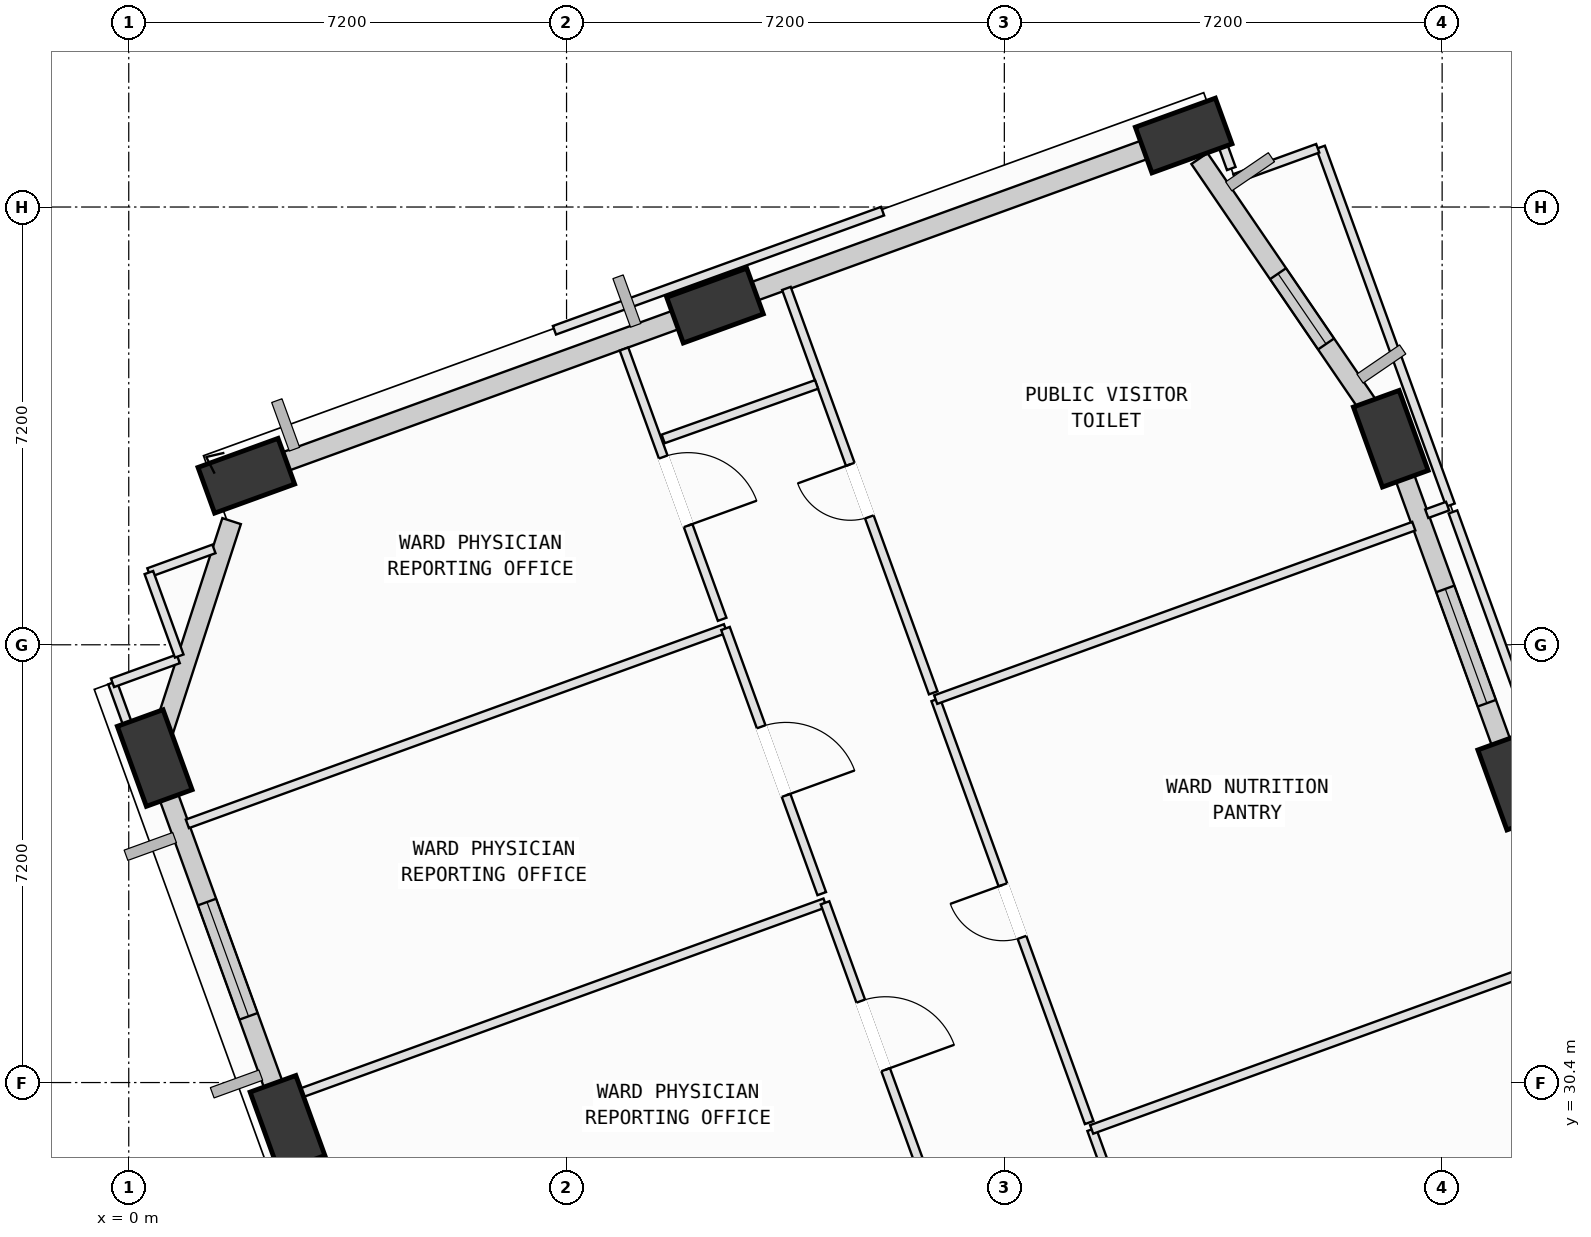
"""IFC4 building model, lengths in metres.
Left out: names, types, materials, properties, quantities, classifications, styles, units other than length and angle.
Written with IfcOpenShell. Run it as: python <this file> out.ifc"""

import sys

from ifc_helpers import new_model, si_unit, direction, frame, frame_2d, origin, origin_2d, place, context, subcontext, project, spatial, rectangle, extrude, element, fill, save


model = new_model("IFC4")
c1 = context("Model", 3, precision=1e-05, world=origin(), true_north=direction((0.0, 1.0)))
c2 = subcontext(c1, "Body", "Model", "MODEL_VIEW")
j1 = project(units=[si_unit("LENGTHUNIT", "METRE"), si_unit("PLANEANGLEUNIT", "RADIAN")], contexts=[c1])
p1 = place(None, origin())
s1 = spatial("IfcSite", under=j1, at=p1, CompositionType="ELEMENT")
p2 = place(p1, origin())
s2 = spatial("IfcBuilding", under=s1, at=p2, CompositionType="ELEMENT")
p3 = place(p2, frame((0.0, 0.0, 108.4)))
s3 = spatial("IfcBuildingStorey", under=s2, at=p3, CompositionType="ELEMENT", Elevation=108.4)
p4 = place(p3, frame((22.803, 35.349, 0.002), z_axis=(-0.043290034921, -0.044997247566, 0.998048706521), x_axis=(0.404543332522, 0.912633441507, 0.058693215586)))
e1 = element("IfcColumn", 1, at=p4, inside=s3, PredefinedType="COLUMN", context=c2, shape_type="SweptSolid", body=[
    extrude(rectangle(XDim=1.4, YDim=0.8, at=origin_2d()), origin(), (0.0, 0.0, 1.0), 4.004),
])
p5 = place(p3, frame((20.755, 40.989, 0.002), z_axis=(-0.066407356828, -0.053564137497, 0.996353825773), x_axis=(0.51476755746, 0.853570569209, 0.080197538401)))
e2 = element("IfcColumn", 2, at=p5, inside=s3, PredefinedType="COLUMN", context=c2, shape_type="SweptSolid", body=[
    extrude(rectangle(XDim=1.4, YDim=0.8, at=origin_2d()), origin(), (0.0, 0.0, 1.0), 4.011),
])
p6 = place(p3, frame((17.349, 45.976, 0.002), z_axis=(-0.086708583507, -0.06770313068, 0.993930534616), x_axis=(0.845797030056, -0.532182759519, 0.037535242352)))
e3 = element("IfcColumn", 3, at=p6, inside=s3, PredefinedType="COLUMN", context=c2, shape_type="SweptSolid", body=[
    extrude(rectangle(XDim=1.4, YDim=0.8, at=origin_2d()), origin(), (0.0, 0.0, 1.0), 4.021),
])
p7 = place(p3, frame((9.641, 43.178, 0.002), z_axis=(-0.074742693001, -0.099111356899, 0.992265321765), x_axis=(0.954352791846, -0.295663340244, 0.042354904456)))
e4 = element("IfcColumn", 4, at=p7, inside=s3, PredefinedType="COLUMN", context=c2, shape_type="SweptSolid", body=[
    extrude(rectangle(XDim=1.4, YDim=0.8, at=origin_2d()), origin(), (0.0, 0.0, 1.0), 4.028),
])
p8 = place(p3, frame((1.934, 40.38, 0.002), z_axis=(-0.062805391638, -0.130386169165, 0.989472045927), x_axis=(0.993375431247, -0.103763584455, 0.049379865685)))
e5 = element("IfcColumn", 5, at=p8, inside=s3, PredefinedType="COLUMN", context=c2, shape_type="SweptSolid", body=[
    extrude(rectangle(XDim=1.4, YDim=0.8, at=origin_2d()), origin(), (0.0, 0.0, 1.0), 4.039),
])
p9 = place(p3, frame((0.427, 35.738, 0.002), z_axis=(-0.043713064568, -0.136459732683, 0.989680710806), x_axis=(-0.041134697553, 0.990033403025, 0.134691490274)))
e6 = element("IfcColumn", 6, at=p9, inside=s3, PredefinedType="COLUMN", context=c2, shape_type="SweptSolid", body=[
    extrude(rectangle(XDim=1.4, YDim=0.8, at=origin_2d()), origin(), (0.0, 0.0, 1.0), 4.038),
])
p10 = place(p3, frame((2.611, 29.722, 0.002), z_axis=(-0.019204163449, -0.127522915018, 0.991649689281), x_axis=(-0.198586028496, 0.972557875578, 0.12122197795)))
e7 = element("IfcColumn", 7, at=p10, inside=s3, PredefinedType="COLUMN", context=c2, shape_type="SweptSolid", body=[
    extrude(rectangle(XDim=1.4, YDim=0.8, at=origin_2d()), origin(), (0.0, 0.0, 1.0), 4.03),
])
p11 = place(p3, frame((20.935, 40.496, 0.0), z_axis=(0.0, 0.0, 1.0), x_axis=(0.341207045833, -0.939988165816, 0.0)))
e8 = element("IfcWall", 8, at=p11, inside=s3, PredefinedType="SOLIDWALL", context=c2, shape_type="SweptSolid", body=[
    extrude(rectangle(XDim=5.047, YDim=0.32, at=frame_2d((2.524, 0.0))), origin(), (0.0, 0.0, 1.0), 3.165),
])
p12 = place(p11, frame((2.103, 0.0, 0.75)))
e9 = element("IfcOpeningElement", 9, at=p12, cuts=e8, PredefinedType="OPENING", context=c2, shape_type="SweptSolid", body=[
    extrude(rectangle(XDim=2.0, YDim=1.95, at=frame_2d((1.0, 0.975))), frame((0.0, 0.17, 0.0), z_axis=(0.0, -1.0, 0.0), x_axis=(1.0, 0.0, 0.0)), (0.0, 0.0, 1.0), 0.34),
])
p13 = place(p3, frame((17.608, 45.597, 0.0), z_axis=(0.0, 0.0, 1.0), x_axis=(0.563970355913, -0.825795033681, 0.0)))
e10 = element("IfcWall", 10, at=p13, inside=s3, PredefinedType="SOLIDWALL", context=c2, shape_type="SweptSolid", body=[
    extrude(rectangle(XDim=5.128, YDim=0.32, at=frame_2d((2.564, 0.0))), origin(), (0.0, 0.0, 1.0), 3.165),
])
p14 = place(p13, frame((2.293, 0.0, 0.75)))
e11 = element("IfcOpeningElement", 11, at=p14, cuts=e10, PredefinedType="OPENING", context=c2, shape_type="SweptSolid", body=[
    extrude(rectangle(XDim=1.4, YDim=1.85, at=frame_2d((0.7, 0.925))), frame((0.0, 0.17, 0.0), z_axis=(0.0, -1.0, 0.0), x_axis=(1.0, 0.0, 0.0)), (0.0, 0.0, 1.0), 0.34),
])
p15 = place(p3, frame((9.893, 43.269, 0.0), z_axis=(0.0, 0.0, 1.0), x_axis=(0.939984522446, 0.341217082753, 0.0)))
e12 = element("IfcWall", 12, at=p15, inside=s3, PredefinedType="SOLIDWALL", context=c2, shape_type="SweptSolid", body=[
    extrude(rectangle(XDim=7.231, YDim=0.32, at=frame_2d((3.615, 0.0))), origin(), (0.0, 0.0, 1.0), 3.165),
])
p16 = place(p3, frame((2.162, 40.463, 0.0), z_axis=(0.0, 0.0, 1.0), x_axis=(0.939993283668, 0.341192946378, 0.0)))
e13 = element("IfcWall", 13, at=p16, inside=s3, PredefinedType="SOLIDWALL", context=c2, shape_type="SweptSolid", body=[
    extrude(rectangle(XDim=7.27, YDim=0.32, at=frame_2d((3.635, 0.0))), origin(), (0.0, 0.0, 1.0), 3.165),
])
p17 = place(p3, frame((0.491, 35.934, 0.0), z_axis=(0.0, 0.0, 1.0), x_axis=(0.308610602602, 0.951188465007, 0.0)))
e14 = element("IfcWall", 14, at=p17, inside=s3, PredefinedType="SOLIDWALL", context=c2, shape_type="SweptSolid", body=[
    extrude(rectangle(XDim=3.89, YDim=0.32, at=frame_2d((1.945, 0.0))), origin(), (0.0, 0.0, 1.0), 3.165),
])
p18 = place(p3, frame((2.525, 29.959, 0.0), z_axis=(0.0, 0.0, 1.0), x_axis=(-0.341222011067, 0.939982733439, 0.0)))
e15 = element("IfcWall", 15, at=p18, inside=s3, PredefinedType="SOLIDWALL", context=c2, shape_type="SweptSolid", body=[
    extrude(rectangle(XDim=5.456, YDim=0.32, at=frame_2d((2.728, 0.0))), origin(), (0.0, 0.0, 1.0), 3.165),
])
p19 = place(p18, frame((1.628, 0.0, 0.75)))
e16 = element("IfcOpeningElement", 16, at=p19, cuts=e15, PredefinedType="OPENING", context=c2, shape_type="SweptSolid", body=[
    extrude(rectangle(XDim=2.0, YDim=1.95, at=frame_2d((1.0, 0.975))), frame((0.0, 0.17, 0.0), z_axis=(0.0, -1.0, 0.0), x_axis=(1.0, 0.0, 0.0)), (0.0, 0.0, 1.0), 0.34),
])
p20 = place(p3, frame((2.602, 30.144, 0.0), z_axis=(0.0, 0.0, 1.0), x_axis=(0.939993165995, 0.341193270571, 0.0)))
e17 = element("IfcWall", 17, at=p20, inside=s3, PredefinedType="PARTITIONING", context=c2, shape_type="SweptSolid", body=[
    extrude(rectangle(XDim=9.414, YDim=0.15, at=frame_2d((4.707, 0.0))), origin(), (0.0, 0.0, 1.0), 3.78),
])
p21 = place(p3, frame((11.451, 33.356, 0.0), z_axis=(0.0, 0.0, 1.0), x_axis=(0.341405037491, -0.939916273067, 0.0)))
e18 = element("IfcWall", 18, at=p21, inside=s3, PredefinedType="PARTITIONING", context=c2, shape_type="SweptSolid", body=[
    extrude(rectangle(XDim=4.64, YDim=0.15, at=frame_2d((2.32, 0.0))), origin(), (0.0, 0.0, 1.0), 2.965),
])
p22 = place(p21, frame((1.72, 0.0, 0.0)))
e19 = element("IfcOpeningElement", 19, at=p22, cuts=e18, PredefinedType="OPENING", context=c2, shape_type="SweptSolid", body=[
    extrude(rectangle(XDim=1.2, YDim=2.15, at=frame_2d((0.6, 1.075))), frame((0.0, 0.085, 0.0), z_axis=(0.0, -1.0, 0.0), x_axis=(1.0, 0.0, 0.0)), (0.0, 0.0, 1.0), 0.17),
])
p23 = place(p3, frame((2.637, 28.977, 0.0), z_axis=(0.0, 0.0, 1.0), x_axis=(-0.342253038206, 0.939607821295, 0.0)))
e20 = element("IfcWall", 20, at=p23, inside=s3, PredefinedType="PARTITIONING", context=c2, shape_type="SweptSolid", body=[
    extrude(rectangle(XDim=0.961, YDim=0.15, at=frame_2d((0.48, 0.0))), origin(), (0.0, 0.0, 1.0), 3.165),
])
p24 = place(p3, frame((0.964, 34.655, 0.0), z_axis=(0.0, 0.0, 1.0), x_axis=(0.939971972714, 0.341251652761, 0.0)))
e21 = element("IfcWall", 21, at=p24, inside=s3, PredefinedType="PARTITIONING", context=c2, shape_type="SweptSolid", body=[
    extrude(rectangle(XDim=9.415, YDim=0.15, at=frame_2d((4.708, 0.0))), origin(), (0.0, 0.0, 1.0), 3.78),
])
p25 = place(p3, frame((9.814, 37.868, 0.0), z_axis=(0.0, 0.0, 1.0), x_axis=(0.341219066922, -0.939983802184, 0.0)))
e22 = element("IfcWall", 22, at=p25, inside=s3, PredefinedType="PARTITIONING", context=c2, shape_type="SweptSolid", body=[
    extrude(rectangle(XDim=4.639, YDim=0.15, at=frame_2d((2.32, 0.0))), origin(), (0.0, 0.0, 1.0), 2.965),
])
p26 = place(p25, frame((1.72, 0.0, 0.0)))
e23 = element("IfcOpeningElement", 23, at=p26, cuts=e22, PredefinedType="OPENING", context=c2, shape_type="SweptSolid", body=[
    extrude(rectangle(XDim=1.2, YDim=2.15, at=frame_2d((0.6, 1.075))), frame((0.0, 0.085, 0.0), z_axis=(0.0, -1.0, 0.0), x_axis=(1.0, 0.0, 0.0)), (0.0, 0.0, 1.0), 0.17),
])
p27 = place(p3, frame((0.331, 38.788, 0.0), z_axis=(0.0, 0.0, 1.0), x_axis=(0.939824729606, 0.341656958983, 0.0)))
e24 = element("IfcWall", 24, at=p27, inside=s3, PredefinedType="PARTITIONING", context=c2, shape_type="SweptSolid", body=[
    extrude(rectangle(XDim=1.138, YDim=0.15, at=frame_2d((0.569, 0.0))), origin(), (0.0, 0.0, 1.0), 3.78),
])
p28 = place(p3, frame((1.502, 39.958, 0.0), z_axis=(0.0, 0.0, 1.0), x_axis=(0.940170604889, 0.340704026542, 0.0)))
e25 = element("IfcWall", 25, at=p28, inside=s3, PredefinedType="PARTITIONING", context=c2, shape_type="SweptSolid", body=[
    extrude(rectangle(XDim=0.792, YDim=0.15, at=frame_2d((0.396, 0.0))), origin(), (0.0, 0.0, 1.0), 3.165),
])
p29 = place(p3, frame((8.145, 42.465, 0.0), z_axis=(0.0, 0.0, 1.0), x_axis=(0.341233257896, -0.939978650665, 0.0)))
e26 = element("IfcWall", 26, at=p29, inside=s3, PredefinedType="PARTITIONING", context=c2, shape_type="SweptSolid", body=[
    extrude(rectangle(XDim=4.73, YDim=0.15, at=frame_2d((2.365, 0.0))), origin(), (0.0, 0.0, 1.0), 2.965),
])
p30 = place(p29, frame((1.89, 0.0, 0.0)))
e27 = element("IfcOpeningElement", 27, at=p30, cuts=e26, PredefinedType="OPENING", context=c2, shape_type="SweptSolid", body=[
    extrude(rectangle(XDim=1.2, YDim=2.15, at=frame_2d((0.6, 1.075))), frame((0.0, 0.085, 0.0), z_axis=(0.0, -1.0, 0.0), x_axis=(1.0, 0.0, 0.0)), (0.0, 0.0, 1.0), 0.17),
])
p31 = place(p3, frame((0.447, 35.008, 0.0), z_axis=(0.0, 0.0, 1.0), x_axis=(-0.341246548403, 0.939973825807, 0.0)))
e28 = element("IfcWall", 28, at=p31, inside=s3, PredefinedType="PARTITIONING", context=c2, shape_type="SweptSolid", body=[
    extrude(rectangle(XDim=2.093, YDim=0.15, at=frame_2d((1.046, 0.0))), origin(), (0.0, 0.0, 1.0), 3.165),
])
p32 = place(p3, frame((-0.267, 36.975, 0.0), z_axis=(0.0, 0.0, 1.0), x_axis=(0.939873962071, 0.341521500671, 0.0)))
e29 = element("IfcWall", 29, at=p32, inside=s3, PredefinedType="PARTITIONING", context=c2, shape_type="SweptSolid", body=[
    extrude(rectangle(XDim=1.15, YDim=0.15, at=frame_2d((0.575, 0.0))), origin(), (0.0, 0.0, 1.0), 3.78),
])
p33 = place(p3, frame((0.83, 37.415, 0.0), z_axis=(0.0, 0.0, 1.0), x_axis=(-0.341582042638, 0.939851960761, 0.0)))
e30 = element("IfcWall", 30, at=p33, inside=s3, PredefinedType="PARTITIONING", context=c2, shape_type="SweptSolid", body=[
    extrude(rectangle(XDim=1.461, YDim=0.15, at=frame_2d((0.73, 0.0))), origin(), (0.0, 0.0, 1.0), 3.78),
])
p34 = place(p3, frame((18.682, 21.789, 0.0), z_axis=(0.0, 0.0, 1.0), x_axis=(-0.341223593307, 0.93998215907, 0.0)))
e31 = element("IfcWall", 31, at=p34, inside=s3, PredefinedType="PARTITIONING", context=c2, shape_type="SweptSolid", body=[
    extrude(rectangle(XDim=8.34, YDim=0.15, at=frame_2d((4.17, 0.0))), origin(), (0.0, 0.0, 1.0), 3.78),
])
p35 = place(p34, frame((3.57, 0.0, 0.0)))
e32 = element("IfcOpeningElement", 32, at=p35, cuts=e31, PredefinedType="OPENING", context=c2, shape_type="SweptSolid", body=[
    extrude(rectangle(XDim=1.2, YDim=2.15, at=frame_2d((0.6, 1.075))), frame((0.0, 0.085, 0.0), z_axis=(0.0, -1.0, 0.0), x_axis=(1.0, 0.0, 0.0)), (0.0, 0.0, 1.0), 0.17),
])
p36 = place(p3, frame((15.836, 29.629, 0.0), z_axis=(0.0, 0.0, 1.0), x_axis=(0.939996069291, 0.341185271836, 0.0)))
e33 = element("IfcWall", 33, at=p36, inside=s3, PredefinedType="PARTITIONING", context=c2, shape_type="SweptSolid", body=[
    extrude(rectangle(XDim=8.365, YDim=0.15, at=frame_2d((4.183, 0.0))), origin(), (0.0, 0.0, 1.0), 3.78),
])
p37 = place(p3, frame((15.795, 29.742, 0.0), z_axis=(0.0, 0.0, 1.0), x_axis=(-0.341080711776, 0.940034014307, 0.0)))
e34 = element("IfcWall", 34, at=p37, inside=s3, PredefinedType="PARTITIONING", context=c2, shape_type="SweptSolid", body=[
    extrude(rectangle(XDim=7.4, YDim=0.15, at=frame_2d((3.7, 0.0))), origin(), (0.0, 0.0, 1.0), 3.78),
])
p38 = place(p37, frame((3.24, 0.0, 0.0)))
e35 = element("IfcOpeningElement", 35, at=p38, cuts=e34, PredefinedType="OPENING", context=c2, shape_type="SweptSolid", body=[
    extrude(rectangle(XDim=0.92, YDim=2.1, at=frame_2d((0.46, 1.05))), frame((0.0, 0.085, 0.0), z_axis=(0.0, -1.0, 0.0), x_axis=(1.0, 0.0, 0.0)), (0.0, 0.0, 1.0), 0.17),
])
p39 = place(p3, frame((13.271, 36.698, 0.0), z_axis=(0.0, 0.0, 1.0), x_axis=(0.940033506521, 0.341082111255, 0.0)))
e36 = element("IfcWall", 36, at=p39, inside=s3, PredefinedType="PARTITIONING", context=c2, shape_type="SweptSolid", body=[
    extrude(rectangle(XDim=8.365, YDim=0.15, at=frame_2d((4.182, 0.0))), origin(), (0.0, 0.0, 1.0), 3.78),
])
p40 = place(p3, frame((21.778, 39.785, 0.0), z_axis=(0.0, 0.0, 1.0), x_axis=(0.341133611606, -0.940014818517, 0.0)))
e37 = element("IfcWall", 37, at=p40, inside=s3, PredefinedType="PARTITIONING", context=c2, shape_type="SweptSolid", body=[
    extrude(rectangle(XDim=7.399, YDim=0.15, at=frame_2d((3.699, 0.0))), origin(), (0.0, 0.0, 1.0), 3.78),
])
p41 = place(p3, frame((19.601, 45.783, 0.0), z_axis=(0.0, 0.0, 1.0), x_axis=(0.341176277605, -0.939999333829, 0.0)))
e38 = element("IfcWall", 38, at=p41, inside=s3, PredefinedType="PARTITIONING", context=c2, shape_type="SweptSolid", body=[
    extrude(rectangle(XDim=6.261, YDim=0.15, at=frame_2d((3.13, 0.0))), origin(), (0.0, 0.0, 1.0), 3.78),
])
p42 = place(p3, frame((21.69, 39.881, 0.0), z_axis=(0.0, 0.0, 1.0), x_axis=(-0.939558904737, -0.34238730194, 0.0)))
e39 = element("IfcWall", 39, at=p42, inside=s3, PredefinedType="PARTITIONING", context=c2, shape_type="SweptSolid", body=[
    extrude(rectangle(XDim=0.365, YDim=0.15, at=frame_2d((0.183, 0.0))), origin(), (0.0, 0.0, 1.0), 3.78),
])
p43 = place(p3, frame((13.23, 36.81, 0.0), z_axis=(0.0, 0.0, 1.0), x_axis=(-0.341188903173, 0.939994751236, 0.0)))
e40 = element("IfcWall", 40, at=p43, inside=s3, PredefinedType="PARTITIONING", context=c2, shape_type="SweptSolid", body=[
    extrude(rectangle(XDim=7.075, YDim=0.15, at=frame_2d((3.538, 0.0))), origin(), (0.0, 0.0, 1.0), 3.78),
])
p44 = place(p43, frame((3.078, 0.0, 0.0)))
e41 = element("IfcOpeningElement", 41, at=p44, cuts=e40, PredefinedType="OPENING", context=c2, shape_type="SweptSolid", body=[
    extrude(rectangle(XDim=0.92, YDim=2.1, at=frame_2d((0.46, 1.05))), frame((0.0, 0.085, 0.0), z_axis=(0.0, -1.0, 0.0), x_axis=(1.0, 0.0, 0.0)), (0.0, 0.0, 1.0), 0.17),
])
p45 = place(p3, frame((16.625, 45.915, 0.0), z_axis=(0.0, 0.0, 1.0), x_axis=(0.940049351348, 0.341038439226, 0.0)))
e42 = element("IfcWall", 42, at=p45, inside=s3, PredefinedType="PARTITIONING", context=c2, shape_type="SweptSolid", body=[
    extrude(rectangle(XDim=1.252, YDim=0.15, at=frame_2d((0.626, 0.0))), origin(), (0.0, 0.0, 1.0), 3.165),
])
p46 = place(p3, frame((17.819, 46.295, 0.0), z_axis=(0.0, 0.0, 1.0), x_axis=(0.341358206186, -0.939933282244, 0.0)))
e43 = element("IfcWall", 43, at=p46, inside=s3, PredefinedType="PARTITIONING", context=c2, shape_type="SweptSolid", body=[
    extrude(rectangle(XDim=0.917, YDim=0.15, at=frame_2d((0.458, 0.0))), origin(), (0.0, 0.0, 1.0), 3.78),
])
p47 = place(p3, frame((18.191, 45.271, 0.0), z_axis=(0.0, 0.0, 1.0), x_axis=(0.939911337045, 0.34141862646, 0.0)))
e44 = element("IfcWall", 44, at=p47, inside=s3, PredefinedType="PARTITIONING", context=c2, shape_type="SweptSolid", body=[
    extrude(rectangle(XDim=1.45, YDim=0.15, at=frame_2d((0.725, 0.0))), origin(), (0.0, 0.0, 1.0), 3.78),
])
p48 = place(p3, frame((11.312, 41.882, 0.0), z_axis=(0.0, 0.0, 1.0), x_axis=(-0.942338715134, -0.334660642979, 0.0)))
e45 = element("IfcWall", 45, at=p48, inside=s3, PredefinedType="PARTITIONING", context=c2, shape_type="SweptSolid", body=[
    extrude(rectangle(XDim=2.677, YDim=0.15, at=frame_2d((1.339, 0.0))), origin(), (0.0, 0.0, 1.0), 3.78),
])
p49 = place(p3, frame((7.001, 42.773, 0.0), z_axis=(0.0, 0.0, 1.0), x_axis=(0.939972102174, 0.341251296165, 0.0)))
e46 = element("IfcWall", 46, at=p49, inside=s3, PredefinedType="PARTITIONING", context=c2, shape_type="SweptSolid", body=[
    extrude(rectangle(XDim=5.74, YDim=0.15, at=frame_2d((2.87, 0.0))), origin(), (0.0, 0.0, 1.0), 3.78),
])
p50 = place(p12, origin())
e47 = element("IfcWindow", 47, at=p50, inside=s3, PartitioningType="SINGLE_PANEL", PredefinedType="WINDOW", context=c2, shape_type="SweptSolid", body=[
    extrude(rectangle(XDim=2.0, YDim=1.95, at=frame_2d((1.0, 0.975))), frame((0.0, 0.03, 0.0), z_axis=(0.0, -1.0, 0.0), x_axis=(1.0, 0.0, 0.0)), (0.0, 0.0, 1.0), 0.06),
])
fill(e9, e47)
p51 = place(p14, origin())
e48 = element("IfcWindow", 48, at=p51, inside=s3, PartitioningType="SINGLE_PANEL", PredefinedType="WINDOW", context=c2, shape_type="SweptSolid", body=[
    extrude(rectangle(XDim=1.4, YDim=1.85, at=frame_2d((0.7, 0.925))), frame((0.0, 0.03, 0.0), z_axis=(0.0, -1.0, 0.0), x_axis=(1.0, 0.0, 0.0)), (0.0, 0.0, 1.0), 0.06),
])
fill(e11, e48)
p52 = place(p19, origin())
e49 = element("IfcWindow", 49, at=p52, inside=s3, PartitioningType="SINGLE_PANEL", PredefinedType="WINDOW", context=c2, shape_type="SweptSolid", body=[
    extrude(rectangle(XDim=2.0, YDim=1.95, at=frame_2d((1.0, 0.975))), frame((0.0, 0.03, 0.0), z_axis=(0.0, -1.0, 0.0), x_axis=(1.0, 0.0, 0.0)), (0.0, 0.0, 1.0), 0.06),
])
fill(e16, e49)
p53 = place(p22, origin())
e50 = element("IfcDoor", 50, at=p53, inside=s3, OperationType="SINGLE_SWING_RIGHT", PredefinedType="DOOR", context=c2, shape_type="SweptSolid", body=[
    extrude(rectangle(XDim=1.2, YDim=2.15, at=frame_2d((0.6, 1.075))), frame((0.0, 0.025, 0.0), z_axis=(0.0, -1.0, 0.0), x_axis=(1.0, 0.0, 0.0)), (0.0, 0.0, 1.0), 0.05),
])
fill(e19, e50)
p54 = place(p26, origin())
e51 = element("IfcDoor", 51, at=p54, inside=s3, OperationType="SINGLE_SWING_RIGHT", PredefinedType="DOOR", context=c2, shape_type="SweptSolid", body=[
    extrude(rectangle(XDim=1.2, YDim=2.15, at=frame_2d((0.6, 1.075))), frame((0.0, 0.025, 0.0), z_axis=(0.0, -1.0, 0.0), x_axis=(1.0, 0.0, 0.0)), (0.0, 0.0, 1.0), 0.05),
])
fill(e23, e51)
p55 = place(p30, origin())
e52 = element("IfcDoor", 52, at=p55, inside=s3, OperationType="SINGLE_SWING_RIGHT", PredefinedType="DOOR", context=c2, shape_type="SweptSolid", body=[
    extrude(rectangle(XDim=1.2, YDim=2.15, at=frame_2d((0.6, 1.075))), frame((0.0, 0.025, 0.0), z_axis=(0.0, -1.0, 0.0), x_axis=(1.0, 0.0, 0.0)), (0.0, 0.0, 1.0), 0.05),
])
fill(e27, e52)
p56 = place(p38, origin())
e53 = element("IfcDoor", 53, at=p56, inside=s3, OperationType="SINGLE_SWING_RIGHT", PredefinedType="DOOR", context=c2, shape_type="SweptSolid", body=[
    extrude(rectangle(XDim=0.92, YDim=2.1, at=frame_2d((0.46, 1.05))), frame((0.0, 0.025, 0.0), z_axis=(0.0, -1.0, 0.0), x_axis=(1.0, 0.0, 0.0)), (0.0, 0.0, 1.0), 0.05),
])
fill(e35, e53)
p57 = place(p44, origin())
e54 = element("IfcDoor", 54, at=p57, inside=s3, OperationType="SINGLE_SWING_RIGHT", PredefinedType="DOOR", context=c2, shape_type="SweptSolid", body=[
    extrude(rectangle(XDim=0.92, YDim=2.1, at=frame_2d((0.46, 1.05))), frame((0.0, 0.025, 0.0), z_axis=(0.0, -1.0, 0.0), x_axis=(1.0, 0.0, 0.0)), (0.0, 0.0, 1.0), 0.05),
])
fill(e41, e54)
save(model, sys.argv[1])
